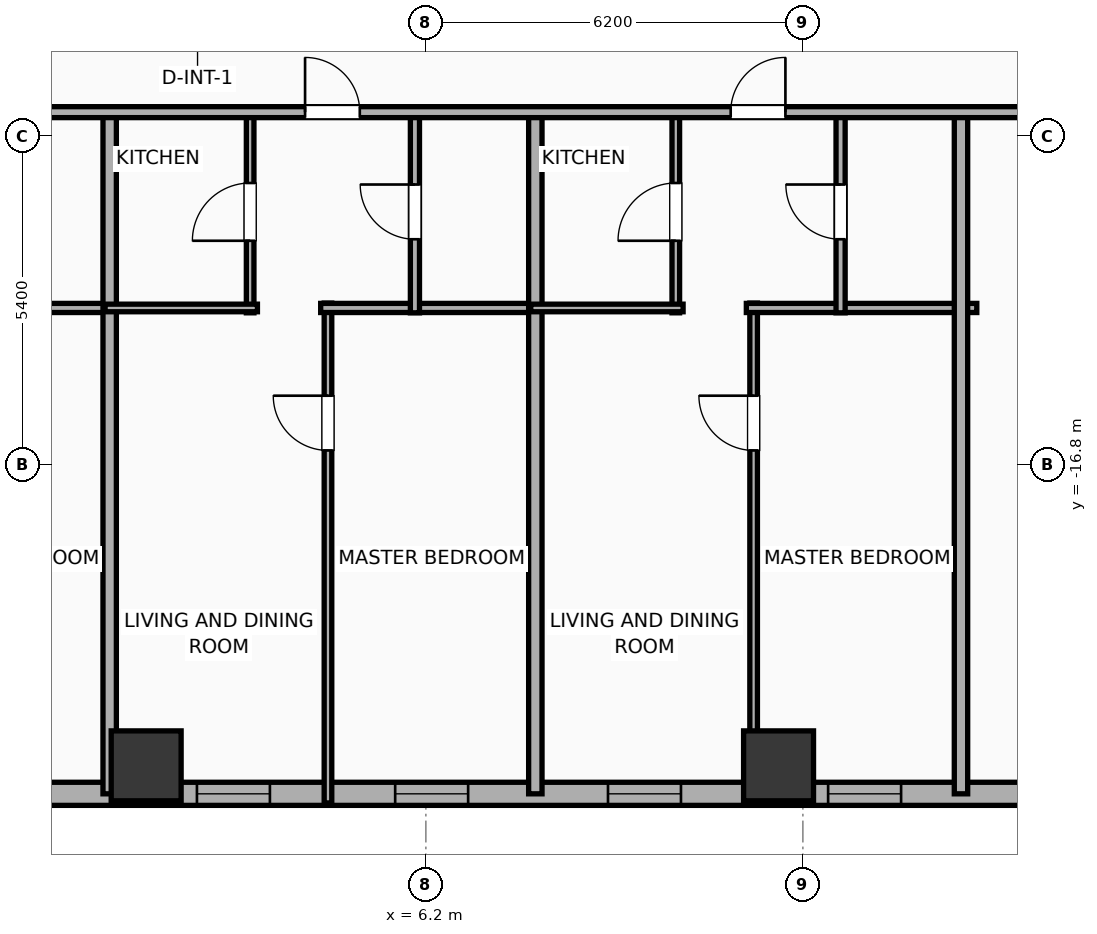
"""IFC4 building model, lengths in metres.
Left out: names, types, materials, properties, quantities, classifications, styles, units other than length and angle.
Written with IfcOpenShell. Run it as: python <this file> out.ifc"""

import sys

from ifc_helpers import new_model, si_unit, direction, frame, frame_2d, origin, origin_2d, place, context, subcontext, project, spatial, rectangle, hollow_rectangle, extrude, element, fill, save


model = new_model("IFC4")
c1 = context("Model", 3, precision=1e-05, world=origin(), true_north=direction((0.0, 1.0)))
c2 = subcontext(c1, "Body", "Model", "MODEL_VIEW")
j1 = project(units=[si_unit("LENGTHUNIT", "METRE"), si_unit("PLANEANGLEUNIT", "RADIAN")], contexts=[c1])
p1 = place(None, origin())
s1 = spatial("IfcSite", under=j1, at=p1, CompositionType="ELEMENT")
p2 = place(p1, origin())
s2 = spatial("IfcBuilding", under=s1, at=p2, CompositionType="ELEMENT")
p3 = place(p2, frame((0.0, 0.0, 65.0)))
s3 = spatial("IfcBuildingStorey", under=s2, at=p3, CompositionType="ELEMENT", Elevation=65.0)
for number, where, z_axis, x_axis in (
    (1, (1.6, -21.75, 0.0), (0.0, 0.0, 1.0), (1.0, 0.0, 0.0)),
    (2, (12.0, -21.75, 0.0), (0.0, 0.0, 1.0), (1.0, 0.0, 0.0)),
):
    element("IfcColumn", number, at=place(p3, frame(where, z_axis=z_axis, x_axis=x_axis)), inside=s3, PredefinedType="COLUMN", context=c2, shape_type="SweptSolid", body=[
        extrude(hollow_rectangle(XDim=1.15, YDim=1.15, WallThickness=0.04, at=origin_2d()), origin(), (0.0, 0.0, 1.0), 3.9),
    ])
p4 = place(p3, frame((22.381, -22.21, 0.0), z_axis=(0.0, 0.0, 1.0), x_axis=(-1.0, 0.0, 0.0)))
e3 = element("IfcWall", 3, at=p4, inside=s3, PredefinedType="ELEMENTEDWALL", context=c2, shape_type="SweptSolid", body=[
    extrude(rectangle(XDim=51.963, YDim=0.38, at=frame_2d((25.981, 0.0))), origin(), (0.0, 0.0, 1.0), 3.65),
])
p5 = place(p4, frame((25.631, 0.0, 0.75)))
e4 = element("IfcOpeningElement", 4, at=p5, cuts=e3, PredefinedType="OPENING", context=c2, shape_type="SweptSolid", body=[
    extrude(rectangle(XDim=2.4, YDim=2.1, at=frame_2d((1.2, 1.05))), frame((0.0, 0.2, 0.0), z_axis=(0.0, -1.0, 0.0), x_axis=(1.0, 0.0, 0.0)), (0.0, 0.0, 1.0), 0.4),
])
p6 = place(p4, frame((42.952, 0.0, 0.75)))
e5 = element("IfcOpeningElement", 5, at=p6, cuts=e3, PredefinedType="OPENING", context=c2, shape_type="SweptSolid", body=[
    extrude(rectangle(XDim=2.4, YDim=2.1, at=frame_2d((1.2, 1.05))), frame((0.0, 0.2, 0.0), z_axis=(0.0, -1.0, 0.0), x_axis=(1.0, 0.0, 0.0)), (0.0, 0.0, 1.0), 0.4),
])
p7 = place(p4, frame((49.433, 0.0, 0.75)))
e6 = element("IfcOpeningElement", 6, at=p7, cuts=e3, PredefinedType="OPENING", context=c2, shape_type="SweptSolid", body=[
    extrude(rectangle(XDim=1.2, YDim=2.05, at=frame_2d((0.6, 1.025))), frame((0.0, 0.2, 0.0), z_axis=(0.0, -1.0, 0.0), x_axis=(1.0, 0.0, 0.0)), (0.0, 0.0, 1.0), 0.4),
])
p8 = place(p4, frame((46.695, 0.0, 0.75)))
e7 = element("IfcOpeningElement", 7, at=p8, cuts=e3, PredefinedType="OPENING", context=c2, shape_type="SweptSolid", body=[
    extrude(rectangle(XDim=1.2, YDim=2.05, at=frame_2d((0.6, 1.025))), frame((0.0, 0.2, 0.0), z_axis=(0.0, -1.0, 0.0), x_axis=(1.0, 0.0, 0.0)), (0.0, 0.0, 1.0), 0.4),
])
p9 = place(p4, frame((39.529, 0.0, 0.75)))
e8 = element("IfcOpeningElement", 8, at=p9, cuts=e3, PredefinedType="OPENING", context=c2, shape_type="SweptSolid", body=[
    extrude(rectangle(XDim=1.2, YDim=2.05, at=frame_2d((0.6, 1.025))), frame((0.0, 0.2, 0.0), z_axis=(0.0, -1.0, 0.0), x_axis=(1.0, 0.0, 0.0)), (0.0, 0.0, 1.0), 0.4),
])
p10 = place(p4, frame((36.486, 0.0, 0.75)))
e9 = element("IfcOpeningElement", 9, at=p10, cuts=e3, PredefinedType="OPENING", context=c2, shape_type="SweptSolid", body=[
    extrude(rectangle(XDim=1.2, YDim=2.05, at=frame_2d((0.6, 1.025))), frame((0.0, 0.2, 0.0), z_axis=(0.0, -1.0, 0.0), x_axis=(1.0, 0.0, 0.0)), (0.0, 0.0, 1.0), 0.4),
])
p11 = place(p4, frame((32.986, 0.0, 0.75)))
e10 = element("IfcOpeningElement", 10, at=p11, cuts=e3, PredefinedType="OPENING", context=c2, shape_type="SweptSolid", body=[
    extrude(rectangle(XDim=1.2, YDim=2.05, at=frame_2d((0.6, 1.025))), frame((0.0, 0.2, 0.0), z_axis=(0.0, -1.0, 0.0), x_axis=(1.0, 0.0, 0.0)), (0.0, 0.0, 1.0), 0.4),
])
p12 = place(p4, frame((29.126, 0.0, 0.75)))
e11 = element("IfcOpeningElement", 11, at=p12, cuts=e3, PredefinedType="OPENING", context=c2, shape_type="SweptSolid", body=[
    extrude(rectangle(XDim=1.2, YDim=2.05, at=frame_2d((0.6, 1.025))), frame((0.0, 0.2, 0.0), z_axis=(0.0, -1.0, 0.0), x_axis=(1.0, 0.0, 0.0)), (0.0, 0.0, 1.0), 0.4),
])
p13 = place(p4, frame((22.486, 0.0, 0.75)))
e12 = element("IfcOpeningElement", 12, at=p13, cuts=e3, PredefinedType="OPENING", context=c2, shape_type="SweptSolid", body=[
    extrude(rectangle(XDim=1.2, YDim=2.05, at=frame_2d((0.6, 1.025))), frame((0.0, 0.2, 0.0), z_axis=(0.0, -1.0, 0.0), x_axis=(1.0, 0.0, 0.0)), (0.0, 0.0, 1.0), 0.4),
])
p14 = place(p4, frame((18.746, 0.0, 0.75)))
e13 = element("IfcOpeningElement", 13, at=p14, cuts=e3, PredefinedType="OPENING", context=c2, shape_type="SweptSolid", body=[
    extrude(rectangle(XDim=1.2, YDim=2.05, at=frame_2d((0.6, 1.025))), frame((0.0, 0.2, 0.0), z_axis=(0.0, -1.0, 0.0), x_axis=(1.0, 0.0, 0.0)), (0.0, 0.0, 1.0), 0.4),
])
p15 = place(p4, frame((15.486, 0.0, 0.75)))
e14 = element("IfcOpeningElement", 14, at=p15, cuts=e3, PredefinedType="OPENING", context=c2, shape_type="SweptSolid", body=[
    extrude(rectangle(XDim=1.2, YDim=2.05, at=frame_2d((0.6, 1.025))), frame((0.0, 0.2, 0.0), z_axis=(0.0, -1.0, 0.0), x_axis=(1.0, 0.0, 0.0)), (0.0, 0.0, 1.0), 0.4),
])
p16 = place(p4, frame((11.986, 0.0, 0.75)))
e15 = element("IfcOpeningElement", 15, at=p16, cuts=e3, PredefinedType="OPENING", context=c2, shape_type="SweptSolid", body=[
    extrude(rectangle(XDim=1.2, YDim=2.05, at=frame_2d((0.6, 1.025))), frame((0.0, 0.2, 0.0), z_axis=(0.0, -1.0, 0.0), x_axis=(1.0, 0.0, 0.0)), (0.0, 0.0, 1.0), 0.4),
])
p17 = place(p4, frame((8.366, 0.0, 0.75)))
e16 = element("IfcOpeningElement", 16, at=p17, cuts=e3, PredefinedType="OPENING", context=c2, shape_type="SweptSolid", body=[
    extrude(rectangle(XDim=1.2, YDim=2.05, at=frame_2d((0.6, 1.025))), frame((0.0, 0.2, 0.0), z_axis=(0.0, -1.0, 0.0), x_axis=(1.0, 0.0, 0.0)), (0.0, 0.0, 1.0), 0.4),
])
p18 = place(p4, frame((5.082, 0.0, 0.75)))
e17 = element("IfcOpeningElement", 17, at=p18, cuts=e3, PredefinedType="OPENING", context=c2, shape_type="SweptSolid", body=[
    extrude(rectangle(XDim=1.2, YDim=2.05, at=frame_2d((0.6, 1.025))), frame((0.0, 0.2, 0.0), z_axis=(0.0, -1.0, 0.0), x_axis=(1.0, 0.0, 0.0)), (0.0, 0.0, 1.0), 0.4),
])
p19 = place(p4, frame((2.277, 0.0, 0.75)))
e18 = element("IfcOpeningElement", 18, at=p19, cuts=e3, PredefinedType="OPENING", context=c2, shape_type="SweptSolid", body=[
    extrude(rectangle(XDim=1.2, YDim=2.05, at=frame_2d((0.6, 1.025))), frame((0.0, 0.2, 0.0), z_axis=(0.0, -1.0, 0.0), x_axis=(1.0, 0.0, 0.0)), (0.0, 0.0, 1.0), 0.4),
])
p20 = place(p4, frame((1.071, 0.0, 0.75)))
e19 = element("IfcOpeningElement", 19, at=p20, cuts=e3, PredefinedType="OPENING", context=c2, shape_type="SweptSolid", body=[
    extrude(rectangle(XDim=0.52, YDim=2.05, at=frame_2d((0.26, 1.025))), frame((0.0, 0.2, 0.0), z_axis=(0.0, -1.0, 0.0), x_axis=(1.0, 0.0, 0.0)), (0.0, 0.0, 1.0), 0.4),
])
p21 = place(p3, frame((-2.53, -14.22, 0.0), z_axis=(0.0, 0.0, 1.0), x_axis=(1.0, 0.0, 0.0)))
e20 = element("IfcWall", 20, at=p21, inside=s3, PredefinedType="PLUMBINGWALL", context=c2, shape_type="SweptSolid", body=[
    extrude(rectangle(XDim=3.605, YDim=0.15, at=frame_2d((1.802, 0.0))), origin(), (0.0, 0.0, 1.0), 3.65),
])
p22 = place(p3, frame((1.0, -22.21, 0.0), z_axis=(0.0, 0.0, 1.0), x_axis=(0.0, 1.0, 0.0)))
e21 = element("IfcWall", 21, at=p22, inside=s3, PredefinedType="PARTITIONING", context=c2, shape_type="SweptSolid", body=[
    extrude(rectangle(XDim=11.29, YDim=0.22, at=frame_2d((5.645, 0.0))), origin(), (0.0, 0.0, 1.0), 3.65),
])
p23 = place(p3, frame((4.59, -22.36, 0.0), z_axis=(0.0, 0.0, 1.0), x_axis=(0.0, 1.0, 0.0)))
e22 = element("IfcWall", 22, at=p23, inside=s3, PredefinedType="PARTITIONING", context=c2, shape_type="SweptSolid", body=[
    extrude(rectangle(XDim=8.22, YDim=0.125, at=frame_2d((4.11, 0.0))), origin(), (0.0, 0.0, 1.0), 3.65),
])
p24 = place(p23, frame((5.797, 0.0, 0.0)))
e23 = element("IfcOpeningElement", 23, at=p24, cuts=e22, PredefinedType="OPENING", context=c2, shape_type="SweptSolid", body=[
    extrude(rectangle(XDim=0.9, YDim=2.05, at=frame_2d((0.45, 1.025))), frame((0.0, 0.073, 0.0), z_axis=(0.0, -1.0, 0.0), x_axis=(1.0, 0.0, 0.0)), (0.0, 0.0, 1.0), 0.145),
])
p25 = place(p3, frame((4.47, -14.22, 0.0), z_axis=(0.0, 0.0, 1.0), x_axis=(1.0, 0.0, 0.0)))
e24 = element("IfcWall", 24, at=p25, inside=s3, PredefinedType="PLUMBINGWALL", context=c2, shape_type="SweptSolid", body=[
    extrude(rectangle(XDim=3.605, YDim=0.15, at=frame_2d((1.802, 0.0))), origin(), (0.0, 0.0, 1.0), 3.65),
])
p26 = place(p3, frame((3.31, -14.3, 0.0), z_axis=(0.0, 0.0, 1.0), x_axis=(0.0, 1.0, 0.0)))
e25 = element("IfcWall", 25, at=p26, inside=s3, PredefinedType="PARTITIONING", context=c2, shape_type="SweptSolid", body=[
    extrude(rectangle(XDim=3.32, YDim=0.125, at=frame_2d((1.66, 0.0))), origin(), (0.0, 0.0, 1.0), 2.94),
])
p27 = place(p26, frame((1.185, 0.0, 0.0)))
e26 = element("IfcOpeningElement", 26, at=p27, cuts=e25, PredefinedType="OPENING", context=c2, shape_type="SweptSolid", body=[
    extrude(rectangle(XDim=0.95, YDim=2.05, at=frame_2d((0.475, 1.025))), frame((0.0, 0.073, 0.0), z_axis=(0.0, -1.0, 0.0), x_axis=(1.0, 0.0, 0.0)), (0.0, 0.0, 1.0), 0.145),
])
p28 = place(p3, frame((0.925, -14.22, 0.0), z_axis=(0.0, 0.0, 1.0), x_axis=(1.0, 0.0, 0.0)))
e27 = element("IfcWall", 27, at=p28, inside=s3, PredefinedType="PARTITIONING", context=c2, shape_type="SweptSolid", body=[
    extrude(rectangle(XDim=2.505, YDim=0.125, at=frame_2d((1.252, 0.0))), origin(), (0.0, 0.0, 1.0), 3.65),
])
p29 = place(p3, frame((6.02, -14.3, 0.0), z_axis=(0.0, 0.0, 1.0), x_axis=(0.0, 1.0, 0.0)))
e28 = element("IfcWall", 28, at=p29, inside=s3, PredefinedType="PLUMBINGWALL", context=c2, shape_type="SweptSolid", body=[
    extrude(rectangle(XDim=3.32, YDim=0.15, at=frame_2d((1.66, 0.0))), origin(), (0.0, 0.0, 1.0), 3.65),
])
p30 = place(p29, frame((1.21, 0.0, 0.0)))
e29 = element("IfcOpeningElement", 29, at=p30, cuts=e28, PredefinedType="OPENING", context=c2, shape_type="SweptSolid", body=[
    extrude(rectangle(XDim=0.9, YDim=2.05, at=frame_2d((0.45, 1.025))), frame((0.0, 0.085, 0.0), z_axis=(0.0, -1.0, 0.0), x_axis=(1.0, 0.0, 0.0)), (0.0, 0.0, 1.0), 0.17),
])
p31 = place(p3, frame((8.0, -22.21, 0.0), z_axis=(0.0, 0.0, 1.0), x_axis=(0.0, 1.0, 0.0)))
e30 = element("IfcWall", 30, at=p31, inside=s3, PredefinedType="PARTITIONING", context=c2, shape_type="SweptSolid", body=[
    extrude(rectangle(XDim=11.29, YDim=0.22, at=frame_2d((5.645, 0.0))), origin(), (0.0, 0.0, 1.0), 3.65),
])
p32 = place(p3, frame((11.59, -22.36, 0.0), z_axis=(0.0, 0.0, 1.0), x_axis=(0.0, 1.0, 0.0)))
e31 = element("IfcWall", 31, at=p32, inside=s3, PredefinedType="PARTITIONING", context=c2, shape_type="SweptSolid", body=[
    extrude(rectangle(XDim=8.22, YDim=0.125, at=frame_2d((4.11, 0.0))), origin(), (0.0, 0.0, 1.0), 3.65),
])
p33 = place(p32, frame((5.797, 0.0, 0.0)))
e32 = element("IfcOpeningElement", 32, at=p33, cuts=e31, PredefinedType="OPENING", context=c2, shape_type="SweptSolid", body=[
    extrude(rectangle(XDim=0.9, YDim=2.05, at=frame_2d((0.45, 1.025))), frame((0.0, 0.073, 0.0), z_axis=(0.0, -1.0, 0.0), x_axis=(1.0, 0.0, 0.0)), (0.0, 0.0, 1.0), 0.145),
])
p34 = place(p3, frame((11.47, -14.22, 0.0), z_axis=(0.0, 0.0, 1.0), x_axis=(1.0, 0.0, 0.0)))
e33 = element("IfcWall", 33, at=p34, inside=s3, PredefinedType="PLUMBINGWALL", context=c2, shape_type="SweptSolid", body=[
    extrude(rectangle(XDim=3.79, YDim=0.15, at=frame_2d((1.895, 0.0))), origin(), (0.0, 0.0, 1.0), 3.65),
])
p35 = place(p3, frame((10.31, -14.3, 0.0), z_axis=(0.0, 0.0, 1.0), x_axis=(0.0, 1.0, 0.0)))
e34 = element("IfcWall", 34, at=p35, inside=s3, PredefinedType="PARTITIONING", context=c2, shape_type="SweptSolid", body=[
    extrude(rectangle(XDim=3.32, YDim=0.125, at=frame_2d((1.66, 0.0))), origin(), (0.0, 0.0, 1.0), 3.65),
])
p36 = place(p35, frame((1.185, 0.0, 0.0)))
e35 = element("IfcOpeningElement", 35, at=p36, cuts=e34, PredefinedType="OPENING", context=c2, shape_type="SweptSolid", body=[
    extrude(rectangle(XDim=0.95, YDim=2.05, at=frame_2d((0.475, 1.025))), frame((0.0, 0.073, 0.0), z_axis=(0.0, -1.0, 0.0), x_axis=(1.0, 0.0, 0.0)), (0.0, 0.0, 1.0), 0.145),
])
p37 = place(p3, frame((7.925, -14.22, 0.0), z_axis=(0.0, 0.0, 1.0), x_axis=(1.0, 0.0, 0.0)))
e36 = element("IfcWall", 36, at=p37, inside=s3, PredefinedType="PARTITIONING", context=c2, shape_type="SweptSolid", body=[
    extrude(rectangle(XDim=2.505, YDim=0.125, at=frame_2d((1.252, 0.0))), origin(), (0.0, 0.0, 1.0), 3.65),
])
p38 = place(p3, frame((13.02, -14.3, 0.0), z_axis=(0.0, 0.0, 1.0), x_axis=(0.0, 1.0, 0.0)))
e37 = element("IfcWall", 37, at=p38, inside=s3, PredefinedType="PLUMBINGWALL", context=c2, shape_type="SweptSolid", body=[
    extrude(rectangle(XDim=3.32, YDim=0.15, at=frame_2d((1.66, 0.0))), origin(), (0.0, 0.0, 1.0), 3.65),
])
p39 = place(p38, frame((1.21, 0.0, 0.0)))
e38 = element("IfcOpeningElement", 38, at=p39, cuts=e37, PredefinedType="OPENING", context=c2, shape_type="SweptSolid", body=[
    extrude(rectangle(XDim=0.9, YDim=2.05, at=frame_2d((0.45, 1.025))), frame((0.0, 0.085, 0.0), z_axis=(0.0, -1.0, 0.0), x_axis=(1.0, 0.0, 0.0)), (0.0, 0.0, 1.0), 0.17),
])
p40 = place(p3, frame((15.0, -22.21, 0.0), z_axis=(0.0, 0.0, 1.0), x_axis=(0.0, 1.0, 0.0)))
e39 = element("IfcWall", 39, at=p40, inside=s3, PredefinedType="PARTITIONING", context=c2, shape_type="SweptSolid", body=[
    extrude(rectangle(XDim=11.29, YDim=0.22, at=frame_2d((5.645, 0.0))), origin(), (0.0, 0.0, 1.0), 3.65),
])
p41 = place(p3, frame((-33.41, -11.0, 0.0), z_axis=(0.0, 0.0, 1.0), x_axis=(1.0, 0.0, 0.0)))
e40 = element("IfcWall", 40, at=p41, inside=s3, PredefinedType="PARTITIONING", context=c2, shape_type="SweptSolid", body=[
    extrude(rectangle(XDim=59.62, YDim=0.18, at=frame_2d((29.81, 0.0))), origin(), (0.0, 0.0, 1.0), 3.65),
])
p42 = place(p41, frame((3.08, 0.0, 0.0)))
e41 = element("IfcOpeningElement", 41, at=p42, cuts=e40, PredefinedType="OPENING", context=c2, shape_type="SweptSolid", body=[
    extrude(rectangle(XDim=0.9, YDim=2.05, at=frame_2d((0.45, 1.025))), frame((0.0, 0.1, 0.0), z_axis=(0.0, -1.0, 0.0), x_axis=(1.0, 0.0, 0.0)), (0.0, 0.0, 1.0), 0.2),
])
p43 = place(p41, frame((9.918, 0.0, 0.0)))
e42 = element("IfcOpeningElement", 42, at=p43, cuts=e40, PredefinedType="OPENING", context=c2, shape_type="SweptSolid", body=[
    extrude(rectangle(XDim=0.9, YDim=2.05, at=frame_2d((0.45, 1.025))), frame((0.0, 0.1, 0.0), z_axis=(0.0, -1.0, 0.0), x_axis=(1.0, 0.0, 0.0)), (0.0, 0.0, 1.0), 0.2),
])
p44 = place(p41, frame((16.721, 0.0, 0.0)))
e43 = element("IfcOpeningElement", 43, at=p44, cuts=e40, PredefinedType="OPENING", context=c2, shape_type="SweptSolid", body=[
    extrude(rectangle(XDim=0.9, YDim=2.05, at=frame_2d((0.45, 1.025))), frame((0.0, 0.1, 0.0), z_axis=(0.0, -1.0, 0.0), x_axis=(1.0, 0.0, 0.0)), (0.0, 0.0, 1.0), 0.2),
])
p45 = place(p41, frame((23.625, 0.0, 0.0)))
e44 = element("IfcOpeningElement", 44, at=p45, cuts=e40, PredefinedType="OPENING", context=c2, shape_type="SweptSolid", body=[
    extrude(rectangle(XDim=0.9, YDim=2.05, at=frame_2d((0.45, 1.025))), frame((0.0, 0.1, 0.0), z_axis=(0.0, -1.0, 0.0), x_axis=(1.0, 0.0, 0.0)), (0.0, 0.0, 1.0), 0.2),
])
p46 = place(p41, frame((30.624, 0.0, 0.0)))
e45 = element("IfcOpeningElement", 45, at=p46, cuts=e40, PredefinedType="OPENING", context=c2, shape_type="SweptSolid", body=[
    extrude(rectangle(XDim=0.9, YDim=2.05, at=frame_2d((0.45, 1.025))), frame((0.0, 0.1, 0.0), z_axis=(0.0, -1.0, 0.0), x_axis=(1.0, 0.0, 0.0)), (0.0, 0.0, 1.0), 0.2),
])
p47 = place(p41, frame((37.623, 0.0, 0.0)))
e46 = element("IfcOpeningElement", 46, at=p47, cuts=e40, PredefinedType="OPENING", context=c2, shape_type="SweptSolid", body=[
    extrude(rectangle(XDim=0.9, YDim=2.05, at=frame_2d((0.45, 1.025))), frame((0.0, 0.1, 0.0), z_axis=(0.0, -1.0, 0.0), x_axis=(1.0, 0.0, 0.0)), (0.0, 0.0, 1.0), 0.2),
])
p48 = place(p41, frame((44.623, 0.0, 0.0)))
e47 = element("IfcOpeningElement", 47, at=p48, cuts=e40, PredefinedType="OPENING", context=c2, shape_type="SweptSolid", body=[
    extrude(rectangle(XDim=0.9, YDim=2.05, at=frame_2d((0.45, 1.025))), frame((0.0, 0.1, 0.0), z_axis=(0.0, -1.0, 0.0), x_axis=(1.0, 0.0, 0.0)), (0.0, 0.0, 1.0), 0.2),
])
p49 = place(p41, frame((49.565, 0.0, 0.0)))
e48 = element("IfcOpeningElement", 48, at=p49, cuts=e40, PredefinedType="OPENING", context=c2, shape_type="SweptSolid", body=[
    extrude(rectangle(XDim=1.15, YDim=2.05, at=frame_2d((0.575, 1.025))), frame((0.0, 0.1, 0.0), z_axis=(0.0, -1.0, 0.0), x_axis=(1.0, 0.0, 0.0)), (0.0, 0.0, 1.0), 0.2),
])
p50 = place(p41, frame((56.583, 0.0, 0.0)))
e49 = element("IfcOpeningElement", 49, at=p50, cuts=e40, PredefinedType="OPENING", context=c2, shape_type="SweptSolid", body=[
    extrude(rectangle(XDim=0.9, YDim=2.05, at=frame_2d((0.45, 1.025))), frame((0.0, 0.1, 0.0), z_axis=(0.0, -1.0, 0.0), x_axis=(1.0, 0.0, 0.0)), (0.0, 0.0, 1.0), 0.2),
])
p51 = place(p14, origin())
e50 = element("IfcWindow", 50, at=p51, inside=s3, PartitioningType="SINGLE_PANEL", PredefinedType="WINDOW", context=c2, shape_type="SweptSolid", body=[
    extrude(rectangle(XDim=1.2, YDim=2.05, at=frame_2d((0.6, 1.025))), frame((0.0, 0.03, 0.0), z_axis=(0.0, -1.0, 0.0), x_axis=(1.0, 0.0, 0.0)), (0.0, 0.0, 1.0), 0.06),
])
fill(e13, e50)
p52 = place(p15, origin())
e51 = element("IfcWindow", 51, at=p52, inside=s3, PartitioningType="SINGLE_PANEL", PredefinedType="WINDOW", context=c2, shape_type="SweptSolid", body=[
    extrude(rectangle(XDim=1.2, YDim=2.05, at=frame_2d((0.6, 1.025))), frame((0.0, 0.03, 0.0), z_axis=(0.0, -1.0, 0.0), x_axis=(1.0, 0.0, 0.0)), (0.0, 0.0, 1.0), 0.06),
])
fill(e14, e51)
p53 = place(p16, origin())
e52 = element("IfcWindow", 52, at=p53, inside=s3, PartitioningType="SINGLE_PANEL", PredefinedType="WINDOW", context=c2, shape_type="SweptSolid", body=[
    extrude(rectangle(XDim=1.2, YDim=2.05, at=frame_2d((0.6, 1.025))), frame((0.0, 0.03, 0.0), z_axis=(0.0, -1.0, 0.0), x_axis=(1.0, 0.0, 0.0)), (0.0, 0.0, 1.0), 0.06),
])
fill(e15, e52)
p54 = place(p17, origin())
e53 = element("IfcWindow", 53, at=p54, inside=s3, PartitioningType="SINGLE_PANEL", PredefinedType="WINDOW", context=c2, shape_type="SweptSolid", body=[
    extrude(rectangle(XDim=1.2, YDim=2.05, at=frame_2d((0.6, 1.025))), frame((0.0, 0.03, 0.0), z_axis=(0.0, -1.0, 0.0), x_axis=(1.0, 0.0, 0.0)), (0.0, 0.0, 1.0), 0.06),
])
fill(e16, e53)
p55 = place(p24, origin())
e54 = element("IfcDoor", 54, at=p55, inside=s3, OperationType="SINGLE_SWING_RIGHT", PredefinedType="DOOR", context=c2, shape_type="SweptSolid", body=[
    extrude(rectangle(XDim=0.9, YDim=2.05, at=frame_2d((0.45, 1.025))), frame((0.0, 0.025, 0.0), z_axis=(0.0, -1.0, 0.0), x_axis=(1.0, 0.0, 0.0)), (0.0, 0.0, 1.0), 0.05),
])
fill(e23, e54)
p56 = place(p27, origin())
e55 = element("IfcDoor", 55, at=p56, inside=s3, OperationType="SINGLE_SWING_LEFT", PredefinedType="DOOR", context=c2, shape_type="SweptSolid", body=[
    extrude(rectangle(XDim=0.95, YDim=2.05, at=frame_2d((0.475, 1.025))), frame((0.0, 0.025, 0.0), z_axis=(0.0, -1.0, 0.0), x_axis=(1.0, 0.0, 0.0)), (0.0, 0.0, 1.0), 0.05),
])
fill(e26, e55)
p57 = place(p30, origin())
e56 = element("IfcDoor", 56, at=p57, inside=s3, OperationType="SINGLE_SWING_RIGHT", PredefinedType="DOOR", context=c2, shape_type="SweptSolid", body=[
    extrude(rectangle(XDim=0.9, YDim=2.05, at=frame_2d((0.45, 1.025))), frame((0.0, 0.025, 0.0), z_axis=(0.0, -1.0, 0.0), x_axis=(1.0, 0.0, 0.0)), (0.0, 0.0, 1.0), 0.05),
])
fill(e29, e56)
p58 = place(p33, origin())
e57 = element("IfcDoor", 57, at=p58, inside=s3, OperationType="SINGLE_SWING_RIGHT", PredefinedType="DOOR", context=c2, shape_type="SweptSolid", body=[
    extrude(rectangle(XDim=0.9, YDim=2.05, at=frame_2d((0.45, 1.025))), frame((0.0, 0.025, 0.0), z_axis=(0.0, -1.0, 0.0), x_axis=(1.0, 0.0, 0.0)), (0.0, 0.0, 1.0), 0.05),
])
fill(e32, e57)
p59 = place(p36, origin())
e58 = element("IfcDoor", 58, at=p59, inside=s3, OperationType="SINGLE_SWING_LEFT", PredefinedType="DOOR", context=c2, shape_type="SweptSolid", body=[
    extrude(rectangle(XDim=0.95, YDim=2.05, at=frame_2d((0.475, 1.025))), frame((0.0, 0.025, 0.0), z_axis=(0.0, -1.0, 0.0), x_axis=(1.0, 0.0, 0.0)), (0.0, 0.0, 1.0), 0.05),
])
fill(e35, e58)
p60 = place(p39, origin())
e59 = element("IfcDoor", 59, at=p60, inside=s3, OperationType="SINGLE_SWING_RIGHT", PredefinedType="DOOR", context=c2, shape_type="SweptSolid", body=[
    extrude(rectangle(XDim=0.9, YDim=2.05, at=frame_2d((0.45, 1.025))), frame((0.0, 0.025, 0.0), z_axis=(0.0, -1.0, 0.0), x_axis=(1.0, 0.0, 0.0)), (0.0, 0.0, 1.0), 0.05),
])
fill(e38, e59)
p61 = place(p47, origin())
e60 = element("IfcDoor", 60, at=p61, inside=s3, OperationType="SINGLE_SWING_LEFT", PredefinedType="DOOR", context=c2, shape_type="SweptSolid", body=[
    extrude(rectangle(XDim=0.9, YDim=2.05, at=frame_2d((0.45, 1.025))), frame((0.0, 0.025, 0.0), z_axis=(0.0, -1.0, 0.0), x_axis=(1.0, 0.0, 0.0)), (0.0, 0.0, 1.0), 0.05),
])
fill(e46, e60)
p62 = place(p48, origin())
e61 = element("IfcDoor", 61, at=p62, inside=s3, OperationType="SINGLE_SWING_RIGHT", PredefinedType="DOOR", context=c2, shape_type="SweptSolid", body=[
    extrude(rectangle(XDim=0.9, YDim=2.05, at=frame_2d((0.45, 1.025))), frame((0.0, 0.025, 0.0), z_axis=(0.0, -1.0, 0.0), x_axis=(1.0, 0.0, 0.0)), (0.0, 0.0, 1.0), 0.05),
])
fill(e47, e61)
save(model, sys.argv[1])
